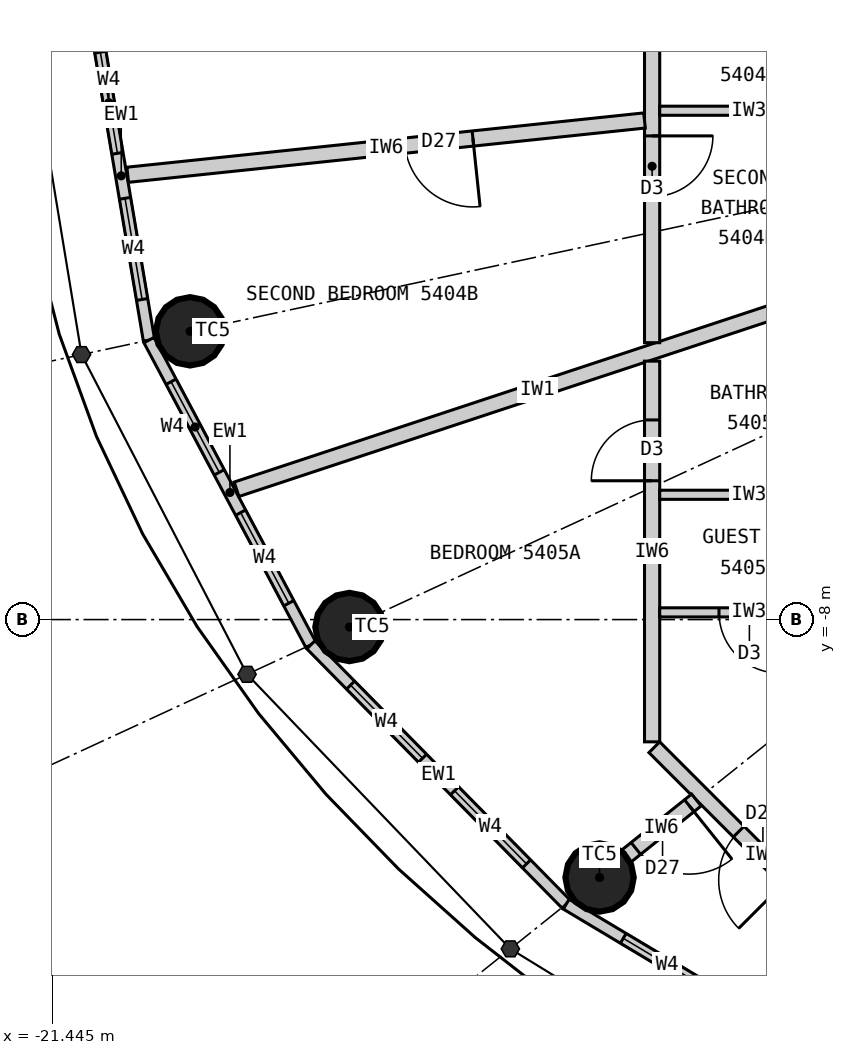
"""IFC4 building model, lengths in metres.
Left out: names, types, materials, properties, quantities, classifications, styles, units other than length and angle.
Written with IfcOpenShell. Run it as: python <this file> out.ifc"""

import sys

from ifc_helpers import new_model, si_unit, direction, frame, frame_2d, origin, origin_2d, place, context, subcontext, project, spatial, rectangle, circle, extrude, element, fill, save


model = new_model("IFC4")
c1 = context("Model", 3, precision=1e-05, world=origin(), true_north=direction((0.0, 1.0)))
c2 = subcontext(c1, "Body", "Model", "MODEL_VIEW")
j1 = project(units=[si_unit("LENGTHUNIT", "METRE"), si_unit("PLANEANGLEUNIT", "RADIAN")], contexts=[c1])
p1 = place(None, origin())
s1 = spatial("IfcSite", under=j1, at=p1, CompositionType="ELEMENT")
p2 = place(p1, origin())
s2 = spatial("IfcBuilding", under=s1, at=p2, CompositionType="ELEMENT")
p3 = place(p2, frame((0.0, 0.0, 202.8)))
s3 = spatial("IfcBuildingStorey", under=s2, at=p3, CompositionType="ELEMENT", Elevation=202.8)
for number, where, z_axis, x_axis in (
    (1, (-19.629, -4.208, 0.0), (0.0, 0.0, 1.0), (1.0, 0.0, 0.0)),
    (2, (-17.532, -8.098, 0.0), (0.0, 0.0, 1.0), (1.0, 0.0, 0.0)),
    (3, (-14.241, -11.393, 0.0), (0.0, 0.0, 1.0), (1.0, 0.0, 0.0)),
):
    element("IfcColumn", number, at=place(p3, frame(where, z_axis=z_axis, x_axis=x_axis)), inside=s3, PredefinedType="COLUMN", context=c2, shape_type="SweptSolid", body=[
        extrude(circle(Radius=0.45, at=origin_2d()), origin(), (0.0, 0.0, 1.0), 3.3),
    ])
p4 = place(p3, frame((-20.9, 0.0, 0.0), z_axis=(0.0, 0.0, 1.0), x_axis=(0.166538513568, -0.986034950445, 0.0)))
e4 = element("IfcWall", 4, at=p4, inside=s3, PredefinedType="ELEMENTEDWALL", context=c2, shape_type="SweptSolid", body=[
    extrude(rectangle(XDim=4.385, YDim=0.15, at=frame_2d((2.192, 0.0))), origin(), (0.0, 0.0, 1.0), 3.12),
])
p5 = place(p4, frame((0.542, 0.0, 0.9)))
e5 = element("IfcOpeningElement", 5, at=p5, cuts=e4, PredefinedType="OPENING", context=c2, shape_type="SweptSolid", body=[
    extrude(rectangle(XDim=1.35, YDim=1.9, at=frame_2d((0.675, 0.95))), frame((0.0, 0.085, 0.0), z_axis=(0.0, -1.0, 0.0), x_axis=(1.0, 0.0, 0.0)), (0.0, 0.0, 1.0), 0.17),
])
p6 = place(p4, frame((2.492, 0.0, 0.9)))
e6 = element("IfcOpeningElement", 6, at=p6, cuts=e4, PredefinedType="OPENING", context=c2, shape_type="SweptSolid", body=[
    extrude(rectangle(XDim=1.35, YDim=1.9, at=frame_2d((0.675, 0.95))), frame((0.0, 0.085, 0.0), z_axis=(0.0, -1.0, 0.0), x_axis=(1.0, 0.0, 0.0)), (0.0, 0.0, 1.0), 0.17),
])
p7 = place(p3, frame((-20.17, -4.323, 0.0), z_axis=(0.0, 0.0, 1.0), x_axis=(0.469256152955, -0.883062094597, 0.0)))
e7 = element("IfcWall", 7, at=p7, inside=s3, PredefinedType="ELEMENTEDWALL", context=c2, shape_type="SweptSolid", body=[
    extrude(rectangle(XDim=4.539, YDim=0.15, at=frame_2d((2.27, 0.0))), origin(), (0.0, 0.0, 1.0), 3.12),
])
p8 = place(p7, frame((0.62, 0.0, 0.9)))
e8 = element("IfcOpeningElement", 8, at=p8, cuts=e7, PredefinedType="OPENING", context=c2, shape_type="SweptSolid", body=[
    extrude(rectangle(XDim=1.35, YDim=1.9, at=frame_2d((0.675, 0.95))), frame((0.0, 0.085, 0.0), z_axis=(0.0, -1.0, 0.0), x_axis=(1.0, 0.0, 0.0)), (0.0, 0.0, 1.0), 0.17),
])
p9 = place(p7, frame((2.57, 0.0, 0.9)))
e9 = element("IfcOpeningElement", 9, at=p9, cuts=e7, PredefinedType="OPENING", context=c2, shape_type="SweptSolid", body=[
    extrude(rectangle(XDim=1.35, YDim=1.9, at=frame_2d((0.675, 0.95))), frame((0.0, 0.085, 0.0), z_axis=(0.0, -1.0, 0.0), x_axis=(1.0, 0.0, 0.0)), (0.0, 0.0, 1.0), 0.17),
])
p10 = place(p3, frame((-18.04, -8.332, 0.0), z_axis=(0.0, 0.0, 1.0), x_axis=(0.701527379618, -0.712642501993, 0.0)))
e10 = element("IfcWall", 10, at=p10, inside=s3, PredefinedType="ELEMENTEDWALL", context=c2, shape_type="SweptSolid", body=[
    extrude(rectangle(XDim=4.788, YDim=0.15, at=frame_2d((2.394, 0.0))), origin(), (0.0, 0.0, 1.0), 3.12),
])
p11 = place(p10, frame((0.744, 0.0, 0.9)))
e11 = element("IfcOpeningElement", 11, at=p11, cuts=e10, PredefinedType="OPENING", context=c2, shape_type="SweptSolid", body=[
    extrude(rectangle(XDim=1.35, YDim=1.9, at=frame_2d((0.675, 0.95))), frame((0.0, 0.085, 0.0), z_axis=(0.0, -1.0, 0.0), x_axis=(1.0, 0.0, 0.0)), (0.0, 0.0, 1.0), 0.17),
])
p12 = place(p10, frame((2.694, 0.0, 0.9)))
e12 = element("IfcOpeningElement", 12, at=p12, cuts=e10, PredefinedType="OPENING", context=c2, shape_type="SweptSolid", body=[
    extrude(rectangle(XDim=1.35, YDim=1.9, at=frame_2d((0.675, 0.95))), frame((0.0, 0.085, 0.0), z_axis=(0.0, -1.0, 0.0), x_axis=(1.0, 0.0, 0.0)), (0.0, 0.0, 1.0), 0.17),
])
p13 = place(p3, frame((-14.68, -11.744, 0.0), z_axis=(0.0, 0.0, 1.0), x_axis=(0.85822150553, -0.513279502265, 0.0)))
e13 = element("IfcWall", 13, at=p13, inside=s3, PredefinedType="ELEMENTEDWALL", context=c2, shape_type="SweptSolid", body=[
    extrude(rectangle(XDim=5.05, YDim=0.15, at=frame_2d((2.525, 0.0))), origin(), (0.0, 0.0, 1.0), 3.12),
])
p14 = place(p13, frame((0.875, 0.0, 0.9)))
e14 = element("IfcOpeningElement", 14, at=p14, cuts=e13, PredefinedType="OPENING", context=c2, shape_type="SweptSolid", body=[
    extrude(rectangle(XDim=1.35, YDim=1.9, at=frame_2d((0.675, 0.95))), frame((0.0, 0.085, 0.0), z_axis=(0.0, -1.0, 0.0), x_axis=(1.0, 0.0, 0.0)), (0.0, 0.0, 1.0), 0.17),
])
p15 = place(p13, frame((2.825, 0.0, 0.9)))
e15 = element("IfcOpeningElement", 15, at=p15, cuts=e13, PredefinedType="OPENING", context=c2, shape_type="SweptSolid", body=[
    extrude(rectangle(XDim=1.35, YDim=1.9, at=frame_2d((0.675, 0.95))), frame((0.0, 0.085, 0.0), z_axis=(0.0, -1.0, 0.0), x_axis=(1.0, 0.0, 0.0)), (0.0, 0.0, 1.0), 0.17),
])
p16 = place(p3, frame((-11.1, -3.669, 0.0), z_axis=(0.0, 0.0, 1.0), x_axis=(-0.949476668397, -0.313837627079, 0.0)))
e16 = element("IfcWall", 16, at=p16, inside=s3, PredefinedType="PARTITIONING", context=c2, shape_type="SweptSolid", body=[
    extrude(rectangle(XDim=8.339, YDim=0.2, at=frame_2d((4.169, 0.0))), origin(), (0.0, 0.0, 1.0), 3.12),
])
p17 = place(p3, frame((-13.55, 8.139, 0.0), z_axis=(0.0, 0.0, 1.0), x_axis=(0.0, -1.0, 0.0)))
e17 = element("IfcWall", 17, at=p17, inside=s3, PredefinedType="PARTITIONING", context=c2, shape_type="SweptSolid", body=[
    extrude(rectangle(XDim=12.496, YDim=0.2, at=frame_2d((6.248, 0.0))), origin(), (0.0, 0.0, 1.0), 3.12),
])
p18 = place(p17, frame((2.42, 0.0, 0.0)))
e18 = element("IfcOpeningElement", 18, at=p18, cuts=e17, PredefinedType="OPENING", context=c2, shape_type="SweptSolid", body=[
    extrude(rectangle(XDim=0.8, YDim=2.1, at=frame_2d((0.4, 1.05))), frame((0.0, 0.11, 0.0), z_axis=(0.0, -1.0, 0.0), x_axis=(1.0, 0.0, 0.0)), (0.0, 0.0, 1.0), 0.22),
])
p19 = place(p17, frame((9.776, 0.0, 0.0)))
e19 = element("IfcOpeningElement", 19, at=p19, cuts=e17, PredefinedType="OPENING", context=c2, shape_type="SweptSolid", body=[
    extrude(rectangle(XDim=0.8, YDim=2.1, at=frame_2d((0.4, 1.05))), frame((0.0, 0.11, 0.0), z_axis=(0.0, -1.0, 0.0), x_axis=(1.0, 0.0, 0.0)), (0.0, 0.0, 1.0), 0.22),
])
p20 = place(p17, frame((5.82, 0.0, 0.0)))
e20 = element("IfcOpeningElement", 20, at=p20, cuts=e17, PredefinedType="OPENING", context=c2, shape_type="SweptSolid", body=[
    extrude(rectangle(XDim=0.9, YDim=2.1, at=frame_2d((0.45, 1.05))), frame((0.0, 0.11, 0.0), z_axis=(0.0, -1.0, 0.0), x_axis=(1.0, 0.0, 0.0)), (0.0, 0.0, 1.0), 0.22),
])
p21 = place(p3, frame((-13.65, -1.434, 0.0), z_axis=(0.0, 0.0, 1.0), x_axis=(-0.994526954268, -0.10448031984, 0.0)))
e21 = element("IfcWall", 21, at=p21, inside=s3, PredefinedType="PARTITIONING", context=c2, shape_type="SweptSolid", body=[
    extrude(rectangle(XDim=6.837, YDim=0.2, at=frame_2d((3.418, 0.0))), origin(), (0.0, 0.0, 1.0), 2.47),
])
p22 = place(p21, frame((2.27, 0.0, 0.0)))
e22 = element("IfcOpeningElement", 22, at=p22, cuts=e21, PredefinedType="OPENING", context=c2, shape_type="SweptSolid", body=[
    extrude(rectangle(XDim=0.9, YDim=2.1, at=frame_2d((0.45, 1.05))), frame((0.0, 0.11, 0.0), z_axis=(0.0, -1.0, 0.0), x_axis=(1.0, 0.0, 0.0)), (0.0, 0.0, 1.0), 0.22),
])
p23 = place(p3, frame((-11.1, -1.306, 0.0), z_axis=(0.0, 0.0, 1.0), x_axis=(-1.0, 0.0, 0.0)))
e23 = element("IfcWall", 23, at=p23, inside=s3, PredefinedType="PARTITIONING", context=c2, shape_type="SweptSolid", body=[
    extrude(rectangle(XDim=2.35, YDim=0.12, at=frame_2d((1.175, 0.0))), origin(), (0.0, 0.0, 1.0), 3.12),
])
p24 = place(p3, frame((-13.55, -4.6, 0.0), z_axis=(0.0, 0.0, 1.0), x_axis=(0.0, -1.0, 0.0)))
e24 = element("IfcWall", 24, at=p24, inside=s3, PredefinedType="PARTITIONING", context=c2, shape_type="SweptSolid", body=[
    extrude(rectangle(XDim=5.009, YDim=0.2, at=frame_2d((2.504, 0.0))), origin(), (0.0, 0.0, 1.0), 3.12),
])
p25 = place(p24, frame((0.774, 0.0, 0.0)))
e25 = element("IfcOpeningElement", 25, at=p25, cuts=e24, PredefinedType="OPENING", context=c2, shape_type="SweptSolid", body=[
    extrude(rectangle(XDim=0.8, YDim=2.1, at=frame_2d((0.4, 1.05))), frame((0.0, 0.11, 0.0), z_axis=(0.0, -1.0, 0.0), x_axis=(1.0, 0.0, 0.0)), (0.0, 0.0, 1.0), 0.22),
])
p26 = place(p3, frame((-13.521, -9.679, 0.0), z_axis=(0.0, 0.0, 1.0), x_axis=(0.707106781187, -0.707106781187, 0.0)))
e26 = element("IfcWall", 26, at=p26, inside=s3, PredefinedType="PARTITIONING", context=c2, shape_type="SweptSolid", body=[
    extrude(rectangle(XDim=4.019, YDim=0.2, at=frame_2d((2.009, 0.0))), origin(), (0.0, 0.0, 1.0), 3.12),
])
p27 = place(p26, frame((1.57, 0.0, 0.0)))
e27 = element("IfcOpeningElement", 27, at=p27, cuts=e26, PredefinedType="OPENING", context=c2, shape_type="SweptSolid", body=[
    extrude(rectangle(XDim=0.9, YDim=2.1, at=frame_2d((0.45, 1.05))), frame((0.0, 0.11, 0.0), z_axis=(0.0, -1.0, 0.0), x_axis=(1.0, 0.0, 0.0)), (0.0, 0.0, 1.0), 0.22),
])
p28 = place(p3, frame((-12.968, -10.374, 0.0), z_axis=(0.0, 0.0, 1.0), x_axis=(-0.780888968944, -0.624669847345, 0.0)))
e28 = element("IfcWall", 28, at=p28, inside=s3, PredefinedType="PARTITIONING", context=c2, shape_type="SweptSolid", body=[
    extrude(rectangle(XDim=1.181, YDim=0.2, at=frame_2d((0.591, 0.0))), origin(), (0.0, 0.0, 1.0), 2.42),
])
p29 = place(p28, frame((0.12, 0.0, 0.0)))
e29 = element("IfcOpeningElement", 29, at=p29, cuts=e28, PredefinedType="OPENING", context=c2, shape_type="SweptSolid", body=[
    extrude(rectangle(XDim=0.9, YDim=2.1, at=frame_2d((0.45, 1.05))), frame((0.0, 0.11, 0.0), z_axis=(0.0, -1.0, 0.0), x_axis=(1.0, 0.0, 0.0)), (0.0, 0.0, 1.0), 0.22),
])
p30 = place(p3, frame((-11.1, -6.358, 0.0), z_axis=(0.0, 0.0, 1.0), x_axis=(-1.0, 0.0, 0.0)))
e30 = element("IfcWall", 30, at=p30, inside=s3, PredefinedType="PARTITIONING", context=c2, shape_type="SweptSolid", body=[
    extrude(rectangle(XDim=2.35, YDim=0.12, at=frame_2d((1.175, 0.0))), origin(), (0.0, 0.0, 1.0), 3.12),
])
p31 = place(p3, frame((-11.1, -7.905, 0.0), z_axis=(0.0, 0.0, 1.0), x_axis=(-1.0, 0.0, 0.0)))
e31 = element("IfcWall", 31, at=p31, inside=s3, PredefinedType="PARTITIONING", context=c2, shape_type="SweptSolid", body=[
    extrude(rectangle(XDim=2.35, YDim=0.12, at=frame_2d((1.175, 0.0))), origin(), (0.0, 0.0, 1.0), 3.12),
])
p32 = place(p31, frame((0.77, 0.0, 0.0)))
e32 = element("IfcOpeningElement", 32, at=p32, cuts=e31, PredefinedType="OPENING", context=c2, shape_type="SweptSolid", body=[
    extrude(rectangle(XDim=0.8, YDim=2.1, at=frame_2d((0.4, 1.05))), frame((0.0, 0.07, 0.0), z_axis=(0.0, -1.0, 0.0), x_axis=(1.0, 0.0, 0.0)), (0.0, 0.0, 1.0), 0.14),
])
p33 = place(p5, origin())
e33 = element("IfcWindow", 33, at=p33, inside=s3, PartitioningType="SINGLE_PANEL", PredefinedType="WINDOW", context=c2, shape_type="SweptSolid", body=[
    extrude(rectangle(XDim=1.35, YDim=1.9, at=frame_2d((0.675, 0.95))), frame((0.0, 0.03, 0.0), z_axis=(0.0, -1.0, 0.0), x_axis=(1.0, 0.0, 0.0)), (0.0, 0.0, 1.0), 0.06),
])
fill(e5, e33)
p34 = place(p6, origin())
e34 = element("IfcWindow", 34, at=p34, inside=s3, PartitioningType="SINGLE_PANEL", PredefinedType="WINDOW", context=c2, shape_type="SweptSolid", body=[
    extrude(rectangle(XDim=1.35, YDim=1.9, at=frame_2d((0.675, 0.95))), frame((0.0, 0.03, 0.0), z_axis=(0.0, -1.0, 0.0), x_axis=(1.0, 0.0, 0.0)), (0.0, 0.0, 1.0), 0.06),
])
fill(e6, e34)
p35 = place(p8, origin())
e35 = element("IfcWindow", 35, at=p35, inside=s3, PartitioningType="SINGLE_PANEL", PredefinedType="WINDOW", context=c2, shape_type="SweptSolid", body=[
    extrude(rectangle(XDim=1.35, YDim=1.9, at=frame_2d((0.675, 0.95))), frame((0.0, 0.03, 0.0), z_axis=(0.0, -1.0, 0.0), x_axis=(1.0, 0.0, 0.0)), (0.0, 0.0, 1.0), 0.06),
])
fill(e8, e35)
p36 = place(p9, origin())
e36 = element("IfcWindow", 36, at=p36, inside=s3, PartitioningType="SINGLE_PANEL", PredefinedType="WINDOW", context=c2, shape_type="SweptSolid", body=[
    extrude(rectangle(XDim=1.35, YDim=1.9, at=frame_2d((0.675, 0.95))), frame((0.0, 0.03, 0.0), z_axis=(0.0, -1.0, 0.0), x_axis=(1.0, 0.0, 0.0)), (0.0, 0.0, 1.0), 0.06),
])
fill(e9, e36)
p37 = place(p11, origin())
e37 = element("IfcWindow", 37, at=p37, inside=s3, PartitioningType="SINGLE_PANEL", PredefinedType="WINDOW", context=c2, shape_type="SweptSolid", body=[
    extrude(rectangle(XDim=1.35, YDim=1.9, at=frame_2d((0.675, 0.95))), frame((0.0, 0.03, 0.0), z_axis=(0.0, -1.0, 0.0), x_axis=(1.0, 0.0, 0.0)), (0.0, 0.0, 1.0), 0.06),
])
fill(e11, e37)
p38 = place(p12, origin())
e38 = element("IfcWindow", 38, at=p38, inside=s3, PartitioningType="SINGLE_PANEL", PredefinedType="WINDOW", context=c2, shape_type="SweptSolid", body=[
    extrude(rectangle(XDim=1.35, YDim=1.9, at=frame_2d((0.675, 0.95))), frame((0.0, 0.03, 0.0), z_axis=(0.0, -1.0, 0.0), x_axis=(1.0, 0.0, 0.0)), (0.0, 0.0, 1.0), 0.06),
])
fill(e12, e38)
p39 = place(p14, origin())
e39 = element("IfcWindow", 39, at=p39, inside=s3, PartitioningType="SINGLE_PANEL", PredefinedType="WINDOW", context=c2, shape_type="SweptSolid", body=[
    extrude(rectangle(XDim=1.35, YDim=1.9, at=frame_2d((0.675, 0.95))), frame((0.0, 0.03, 0.0), z_axis=(0.0, -1.0, 0.0), x_axis=(1.0, 0.0, 0.0)), (0.0, 0.0, 1.0), 0.06),
])
fill(e14, e39)
p40 = place(p19, origin())
e40 = element("IfcDoor", 40, at=p40, inside=s3, OperationType="SINGLE_SWING_LEFT", PredefinedType="DOOR", context=c2, shape_type="SweptSolid", body=[
    extrude(rectangle(XDim=0.8, YDim=2.1, at=frame_2d((0.4, 1.05))), frame((0.0, 0.025, 0.0), z_axis=(0.0, -1.0, 0.0), x_axis=(1.0, 0.0, 0.0)), (0.0, 0.0, 1.0), 0.05),
])
fill(e19, e40)
p41 = place(p22, origin())
e41 = element("IfcDoor", 41, at=p41, inside=s3, OperationType="SINGLE_SWING_LEFT", PredefinedType="DOOR", context=c2, shape_type="SweptSolid", body=[
    extrude(rectangle(XDim=0.9, YDim=2.1, at=frame_2d((0.45, 1.05))), frame((0.0, 0.025, 0.0), z_axis=(0.0, -1.0, 0.0), x_axis=(1.0, 0.0, 0.0)), (0.0, 0.0, 1.0), 0.05),
])
fill(e22, e41)
p42 = place(p25, origin())
e42 = element("IfcDoor", 42, at=p42, inside=s3, OperationType="SINGLE_SWING_RIGHT", PredefinedType="DOOR", context=c2, shape_type="SweptSolid", body=[
    extrude(rectangle(XDim=0.8, YDim=2.1, at=frame_2d((0.4, 1.05))), frame((0.0, 0.025, 0.0), z_axis=(0.0, -1.0, 0.0), x_axis=(1.0, 0.0, 0.0)), (0.0, 0.0, 1.0), 0.05),
])
fill(e25, e42)
p43 = place(p32, origin())
e43 = element("IfcDoor", 43, at=p43, inside=s3, OperationType="SINGLE_SWING_LEFT", PredefinedType="DOOR", context=c2, shape_type="SweptSolid", body=[
    extrude(rectangle(XDim=0.8, YDim=2.1, at=frame_2d((0.4, 1.05))), frame((0.0, 0.025, 0.0), z_axis=(0.0, -1.0, 0.0), x_axis=(1.0, 0.0, 0.0)), (0.0, 0.0, 1.0), 0.05),
])
fill(e32, e43)
p44 = place(p27, origin())
e44 = element("IfcDoor", 44, at=p44, inside=s3, OperationType="SINGLE_SWING_RIGHT", PredefinedType="DOOR", context=c2, shape_type="SweptSolid", body=[
    extrude(rectangle(XDim=0.9, YDim=2.1, at=frame_2d((0.45, 1.05))), frame((0.0, 0.025, 0.0), z_axis=(0.0, -1.0, 0.0), x_axis=(1.0, 0.0, 0.0)), (0.0, 0.0, 1.0), 0.05),
])
fill(e27, e44)
p45 = place(p29, origin())
e45 = element("IfcDoor", 45, at=p45, inside=s3, OperationType="SINGLE_SWING_LEFT", PredefinedType="DOOR", context=c2, shape_type="SweptSolid", body=[
    extrude(rectangle(XDim=0.9, YDim=2.1, at=frame_2d((0.45, 1.05))), frame((0.0, 0.025, 0.0), z_axis=(0.0, -1.0, 0.0), x_axis=(1.0, 0.0, 0.0)), (0.0, 0.0, 1.0), 0.05),
])
fill(e29, e45)
save(model, sys.argv[1])
